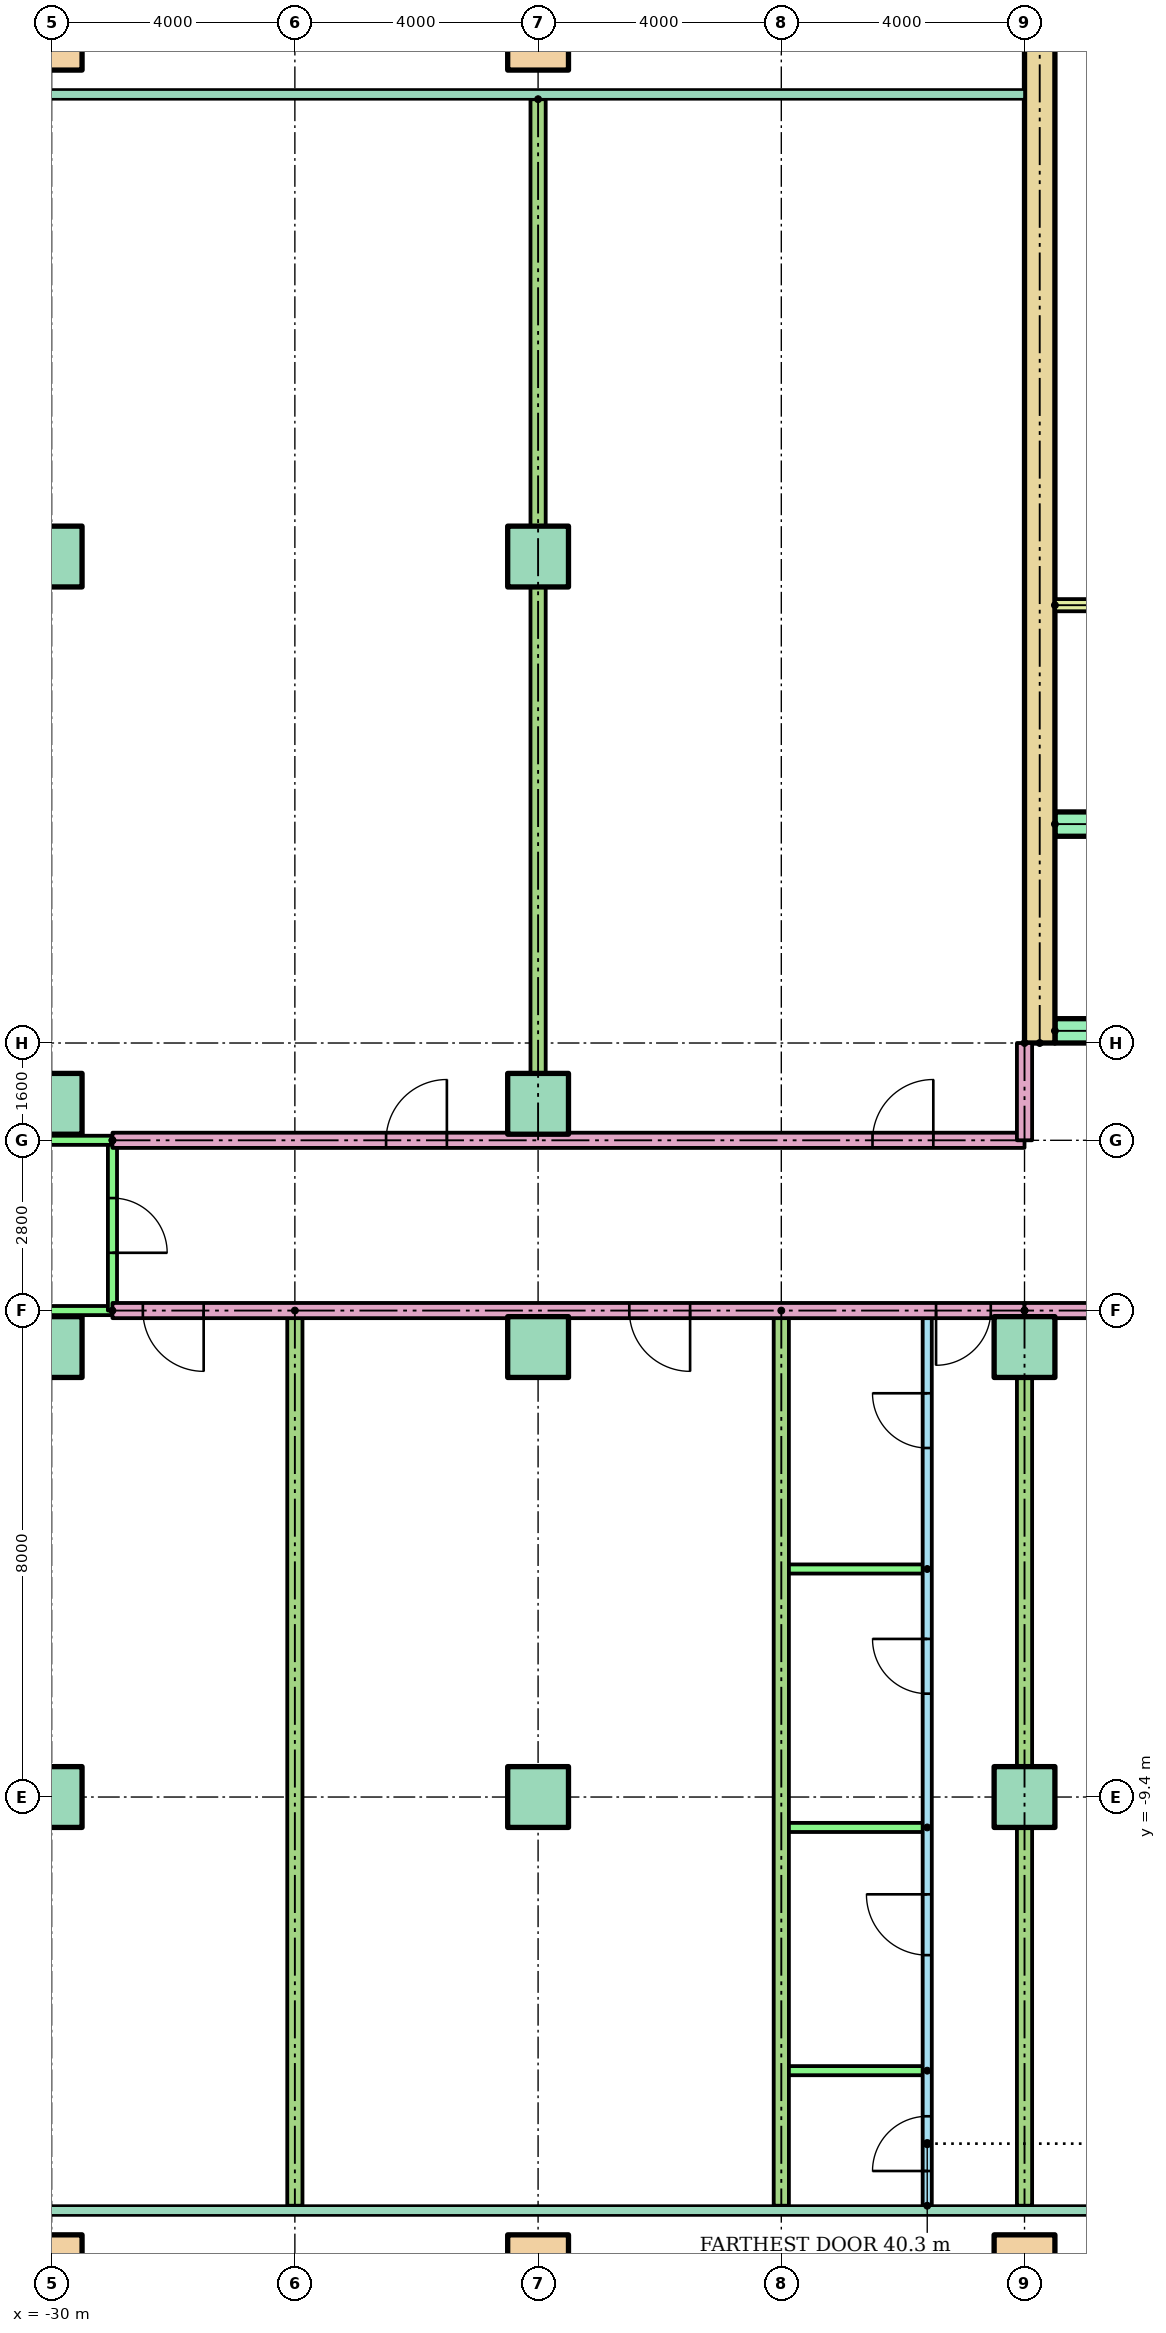
"""IFC4 building model, lengths in metres.
Left out: names, types, materials, properties, quantities, classifications, styles, units other than length and angle.
Written with IfcOpenShell. Run it as: python <this file> out.ifc"""

import sys

from ifc_helpers import new_model, si_unit, direction, frame, frame_2d, origin, origin_2d, place, context, subcontext, project, spatial, rectangle, hollow_rectangle, extrude, element, fill, save


model = new_model("IFC4")
c1 = context("Model", 3, precision=1e-05, world=origin(), true_north=direction((0.0, 1.0)))
c2 = subcontext(c1, "Body", "Model", "MODEL_VIEW")
j1 = project(units=[si_unit("LENGTHUNIT", "METRE"), si_unit("PLANEANGLEUNIT", "RADIAN")], contexts=[c1])
p1 = place(None, origin())
s1 = spatial("IfcSite", under=j1, at=p1, CompositionType="ELEMENT")
p2 = place(p1, origin())
s2 = spatial("IfcBuilding", under=s1, at=p2, CompositionType="ELEMENT")
p3 = place(p2, frame((0.0, 0.0, 29.9)))
s3 = spatial("IfcBuildingStorey", under=s2, at=p3, CompositionType="ELEMENT", Elevation=29.9)
for number, where in (
    (1, (-30.0, -17.1, 0.0)),
    (2, (-22.0, -17.1, 0.0)),
    (3, (-14.0, -17.1, 0.0)),
):
    element("IfcColumn", number, at=place(p3, frame(where)), inside=s3, PredefinedType="COLUMN", context=c2, shape_type="SweptSolid", body=[
        extrude(hollow_rectangle(XDim=1.0, YDim=1.0, WallThickness=0.05, at=origin_2d()), origin(), (0.0, 0.0, 1.0), 3.9),
    ])
for number, where in (
    (4, (-30.0, -9.4, 0.0)),
    (5, (-22.0, -9.4, 0.0)),
    (6, (-14.0, -9.4, 0.0)),
    (7, (-30.0, -2.0, 0.0)),
    (8, (-22.0, -2.0, 0.0)),
    (9, (-14.0, -2.0, 0.0)),
    (10, (-30.0, 2.0, 0.0)),
    (11, (-22.0, 2.0, 0.0)),
    (12, (-30.0, 11.0, 0.0)),
    (13, (-22.0, 11.0, 0.0)),
):
    element("IfcColumn", number, at=place(p3, frame(where)), inside=s3, PredefinedType="COLUMN", context=c2, shape_type="SweptSolid", body=[
        extrude(rectangle(XDim=1.0, YDim=1.0, at=origin_2d()), origin(), (0.0, 0.0, 1.0), 3.9),
    ])
for number, where in (
    (14, (-30.0, 19.5, 0.0)),
    (15, (-22.0, 19.5, 0.0)),
):
    element("IfcColumn", number, at=place(p3, frame(where)), inside=s3, PredefinedType="COLUMN", context=c2, shape_type="SweptSolid", body=[
        extrude(hollow_rectangle(XDim=1.0, YDim=1.0, WallThickness=0.05, at=origin_2d()), origin(), (0.0, 0.0, 1.0), 3.9),
    ])
p4 = place(p3, frame((-13.75, 3.0, 0.0), z_axis=(0.0, 0.0, 1.0), x_axis=(0.0, 1.0, 0.0)))
e16 = element("IfcWall", 16, at=p4, inside=s3, PredefinedType="SHEAR", context=c2, shape_type="SweptSolid", body=[
    extrude(rectangle(XDim=17.0, YDim=0.5, at=frame_2d((8.5, 0.0))), origin(), (0.0, 0.0, 1.0), 3.6),
])
p5 = place(p3, frame((-13.5, 3.2, 0.0)))
e17 = element("IfcWall", 17, at=p5, inside=s3, PredefinedType="SHEAR", context=c2, shape_type="SweptSolid", body=[
    extrude(rectangle(XDim=27.0, YDim=0.4, at=frame_2d((13.5, 0.0))), origin(), (0.0, 0.0, 1.0), 3.6),
])
p6 = place(p5, frame((6.861, 0.0, 0.0)))
e18 = element("IfcOpeningElement", 18, at=p6, cuts=e17, PredefinedType="OPENING", context=c2, shape_type="SweptSolid", body=[
    extrude(rectangle(XDim=1.1, YDim=2.1, at=frame_2d((0.55, 1.05))), frame((0.0, 0.21, 0.0), z_axis=(0.0, -1.0, 0.0), x_axis=(1.0, 0.0, 0.0)), (0.0, 0.0, 1.0), 0.42),
])
p7 = place(p5, frame((9.906, 0.0, 0.0)))
e19 = element("IfcOpeningElement", 19, at=p7, cuts=e17, PredefinedType="OPENING", context=c2, shape_type="SweptSolid", body=[
    extrude(rectangle(XDim=1.1, YDim=2.1, at=frame_2d((0.55, 1.05))), frame((0.0, 0.21, 0.0), z_axis=(0.0, -1.0, 0.0), x_axis=(1.0, 0.0, 0.0)), (0.0, 0.0, 1.0), 0.42),
])
p8 = place(p5, frame((15.994, 0.0, 0.0)))
e20 = element("IfcOpeningElement", 20, at=p8, cuts=e17, PredefinedType="OPENING", context=c2, shape_type="SweptSolid", body=[
    extrude(rectangle(XDim=1.1, YDim=2.1, at=frame_2d((0.55, 1.05))), frame((0.0, 0.21, 0.0), z_axis=(0.0, -1.0, 0.0), x_axis=(1.0, 0.0, 0.0)), (0.0, 0.0, 1.0), 0.42),
])
p9 = place(p5, frame((19.039, 0.0, 0.0)))
e21 = element("IfcOpeningElement", 21, at=p9, cuts=e17, PredefinedType="OPENING", context=c2, shape_type="SweptSolid", body=[
    extrude(rectangle(XDim=1.1, YDim=2.1, at=frame_2d((0.55, 1.05))), frame((0.0, 0.21, 0.0), z_axis=(0.0, -1.0, 0.0), x_axis=(1.0, 0.0, 0.0)), (0.0, 0.0, 1.0), 0.42),
])
p10 = place(p5, frame((12.6, 0.0, 0.0)))
e22 = element("IfcOpeningElement", 22, at=p10, cuts=e17, PredefinedType="OPENING", context=c2, shape_type="SweptSolid", body=[
    extrude(rectangle(XDim=1.8, YDim=2.1, at=frame_2d((0.9, 1.05))), frame((0.0, 0.21, 0.0), z_axis=(0.0, -1.0, 0.0), x_axis=(1.0, 0.0, 0.0)), (0.0, 0.0, 1.0), 0.42),
])
p11 = place(p3, frame((-13.5, 6.6, 0.0)))
e23 = element("IfcWall", 23, at=p11, inside=s3, PredefinedType="SHEAR", context=c2, shape_type="SweptSolid", body=[
    extrude(rectangle(XDim=11.978, YDim=0.4, at=frame_2d((5.989, 0.0))), origin(), (0.0, 0.0, 1.0), 3.6),
])
p12 = place(p3, frame((-13.5, 10.2, 0.0)))
e24 = element("IfcWall", 24, at=p12, inside=s3, PredefinedType="PARTITIONING", context=c2, shape_type="SweptSolid", body=[
    extrude(rectangle(XDim=3.9, YDim=0.2, at=frame_2d((1.95, 0.0))), origin(), (0.0, 0.0, 1.0), 3.6),
])
p13 = place(p3, frame((-14.0, -1.4, 0.0), z_axis=(0.0, 0.0, 1.0), x_axis=(-1.0, 0.0, 0.0)))
e25 = element("IfcWall", 25, at=p13, inside=s3, PredefinedType="PARTITIONING", context=c2, shape_type="SweptSolid", body=[
    extrude(rectangle(XDim=15.0, YDim=0.25, at=frame_2d((7.5, 0.0))), origin(), (0.0, 0.0, 1.0), 3.1),
])
p14 = place(p13, frame((0.555, 0.0, 0.0)))
e26 = element("IfcOpeningElement", 26, at=p14, cuts=e25, PredefinedType="OPENING", context=c2, shape_type="SweptSolid", body=[
    extrude(rectangle(XDim=0.9, YDim=2.1, at=frame_2d((0.45, 1.05))), frame((0.0, 0.135, 0.0), z_axis=(0.0, -1.0, 0.0), x_axis=(1.0, 0.0, 0.0)), (0.0, 0.0, 1.0), 0.27),
])
p15 = place(p13, frame((5.5, 0.0, 0.0)))
e27 = element("IfcOpeningElement", 27, at=p15, cuts=e25, PredefinedType="OPENING", context=c2, shape_type="SweptSolid", body=[
    extrude(rectangle(XDim=1.0, YDim=2.1, at=frame_2d((0.5, 1.05))), frame((0.0, 0.135, 0.0), z_axis=(0.0, -1.0, 0.0), x_axis=(1.0, 0.0, 0.0)), (0.0, 0.0, 1.0), 0.27),
])
p16 = place(p13, frame((13.5, 0.0, 0.0)))
e28 = element("IfcOpeningElement", 28, at=p16, cuts=e25, PredefinedType="OPENING", context=c2, shape_type="SweptSolid", body=[
    extrude(rectangle(XDim=1.0, YDim=2.1, at=frame_2d((0.5, 1.05))), frame((0.0, 0.135, 0.0), z_axis=(0.0, -1.0, 0.0), x_axis=(1.0, 0.0, 0.0)), (0.0, 0.0, 1.0), 0.27),
])
p17 = place(p3, frame((-29.0, -1.4, 0.0), z_axis=(0.0, 0.0, 1.0), x_axis=(-1.0, 0.0, 0.0)))
e29 = element("IfcWall", 29, at=p17, inside=s3, PredefinedType="PARTITIONING", context=c2, shape_type="SweptSolid", body=[
    extrude(rectangle(XDim=7.53, YDim=0.15, at=frame_2d((3.765, 0.0))), origin(), (0.0, 0.0, 1.0), 3.1),
])
p18 = place(p3, frame((-29.0, 1.4, 0.0), z_axis=(0.0, 0.0, 1.0), x_axis=(0.0, -1.0, 0.0)))
e30 = element("IfcWall", 30, at=p18, inside=s3, PredefinedType="PARTITIONING", context=c2, shape_type="SweptSolid", body=[
    extrude(rectangle(XDim=2.8, YDim=0.15, at=frame_2d((1.4, 0.0))), origin(), (0.0, 0.0, 1.0), 3.1),
])
p19 = place(p18, frame((0.95, 0.0, 0.0)))
e31 = element("IfcOpeningElement", 31, at=p19, cuts=e30, PredefinedType="OPENING", context=c2, shape_type="SweptSolid", body=[
    extrude(rectangle(XDim=0.9, YDim=2.1, at=frame_2d((0.45, 1.05))), frame((0.0, 0.085, 0.0), z_axis=(0.0, -1.0, 0.0), x_axis=(1.0, 0.0, 0.0)), (0.0, 0.0, 1.0), 0.17),
])
p20 = place(p3, frame((-15.6, -16.121, 0.0), z_axis=(0.0, 0.0, 1.0), x_axis=(0.0, 1.0, 0.0)))
e32 = element("IfcWall", 32, at=p20, inside=s3, PredefinedType="PARTITIONING", context=c2, shape_type="SweptSolid", body=[
    extrude(rectangle(XDim=14.721, YDim=0.15, at=frame_2d((7.361, 0.0))), origin(), (0.0, 0.0, 1.0), 3.1),
])
p21 = place(p20, frame((12.461, 0.0, 0.0)))
e33 = element("IfcOpeningElement", 33, at=p21, cuts=e32, PredefinedType="OPENING", context=c2, shape_type="SweptSolid", body=[
    extrude(rectangle(XDim=0.9, YDim=2.1, at=frame_2d((0.45, 1.05))), frame((0.0, 0.085, 0.0), z_axis=(0.0, -1.0, 0.0), x_axis=(1.0, 0.0, 0.0)), (0.0, 0.0, 1.0), 0.17),
])
p22 = place(p20, frame((8.421, 0.0, 0.0)))
e34 = element("IfcOpeningElement", 34, at=p22, cuts=e32, PredefinedType="OPENING", context=c2, shape_type="SweptSolid", body=[
    extrude(rectangle(XDim=0.9, YDim=2.1, at=frame_2d((0.45, 1.05))), frame((0.0, 0.085, 0.0), z_axis=(0.0, -1.0, 0.0), x_axis=(1.0, 0.0, 0.0)), (0.0, 0.0, 1.0), 0.17),
])
p23 = place(p20, frame((4.121, 0.0, 0.0)))
e35 = element("IfcOpeningElement", 35, at=p23, cuts=e32, PredefinedType="OPENING", context=c2, shape_type="SweptSolid", body=[
    extrude(rectangle(XDim=1.0, YDim=2.1, at=frame_2d((0.5, 1.05))), frame((0.0, 0.085, 0.0), z_axis=(0.0, -1.0, 0.0), x_axis=(1.0, 0.0, 0.0)), (0.0, 0.0, 1.0), 0.17),
])
p24 = place(p20, frame((0.571, 0.0, 0.0)))
e36 = element("IfcOpeningElement", 36, at=p24, cuts=e32, PredefinedType="OPENING", context=c2, shape_type="SweptSolid", body=[
    extrude(rectangle(XDim=0.9, YDim=2.1, at=frame_2d((0.45, 1.05))), frame((0.0, 0.085, 0.0), z_axis=(0.0, -1.0, 0.0), x_axis=(1.0, 0.0, 0.0)), (0.0, 0.0, 1.0), 0.17),
])
for number, where, z_axis, x_axis in (
    (37, (-15.6, -5.65, 0.0), (0.0, 0.0, 1.0), (-1.0, 0.0, 0.0)),
    (38, (-15.6, -9.9, 0.0), (0.0, 0.0, 1.0), (-1.0, 0.0, 0.0)),
    (39, (-15.6, -13.9, 0.0), (0.0, 0.0, 1.0), (-1.0, 0.0, 0.0)),
):
    element("IfcWall", number, at=place(p3, frame(where, z_axis=z_axis, x_axis=x_axis)), inside=s3, PredefinedType="PARTITIONING", context=c2, shape_type="SweptSolid", body=[
        extrude(rectangle(XDim=2.4, YDim=0.15, at=frame_2d((1.2, 0.0))), origin(), (0.0, 0.0, 1.0), 3.1),
    ])
for number, where, z_axis, x_axis in (
    (40, (-26.0, -1.4, 0.0), (0.0, 0.0, 1.0), (0.0, -1.0, 0.0)),
    (41, (-18.0, -1.4, 0.0), (0.0, 0.0, 1.0), (0.0, -1.0, 0.0)),
    (42, (-14.0, -1.4, 0.0), (0.0, 0.0, 1.0), (0.0, -1.0, 0.0)),
):
    element("IfcWall", number, at=place(p3, frame(where, z_axis=z_axis, x_axis=x_axis)), inside=s3, PredefinedType="PARTITIONING", context=c2, shape_type="SweptSolid", body=[
        extrude(rectangle(XDim=14.721, YDim=0.25, at=frame_2d((7.361, 0.0))), origin(), (0.0, 0.0, 1.0), 3.1),
    ])
p25 = place(p3, frame((-29.0, 1.4, 0.0)))
e43 = element("IfcWall", 43, at=p25, inside=s3, PredefinedType="PARTITIONING", context=c2, shape_type="SweptSolid", body=[
    extrude(rectangle(XDim=15.0, YDim=0.25, at=frame_2d((7.5, 0.0))), origin(), (0.0, 0.0, 1.0), 3.1),
])
p26 = place(p25, frame((12.5, 0.0, 0.0)))
e44 = element("IfcOpeningElement", 44, at=p26, cuts=e43, PredefinedType="OPENING", context=c2, shape_type="SweptSolid", body=[
    extrude(rectangle(XDim=1.0, YDim=2.1, at=frame_2d((0.5, 1.05))), frame((0.0, 0.135, 0.0), z_axis=(0.0, -1.0, 0.0), x_axis=(1.0, 0.0, 0.0)), (0.0, 0.0, 1.0), 0.27),
])
p27 = place(p25, frame((4.5, 0.0, 0.0)))
e45 = element("IfcOpeningElement", 45, at=p27, cuts=e43, PredefinedType="OPENING", context=c2, shape_type="SweptSolid", body=[
    extrude(rectangle(XDim=1.0, YDim=2.1, at=frame_2d((0.5, 1.05))), frame((0.0, 0.135, 0.0), z_axis=(0.0, -1.0, 0.0), x_axis=(1.0, 0.0, 0.0)), (0.0, 0.0, 1.0), 0.27),
])
p28 = place(p3, frame((-36.53, 1.4, 0.0)))
e46 = element("IfcWall", 46, at=p28, inside=s3, PredefinedType="PARTITIONING", context=c2, shape_type="SweptSolid", body=[
    extrude(rectangle(XDim=7.53, YDim=0.15, at=frame_2d((3.765, 0.0))), origin(), (0.0, 0.0, 1.0), 3.1),
])
p29 = place(p3, frame((-22.0, 18.521, 0.0), z_axis=(0.0, 0.0, 1.0), x_axis=(0.0, -1.0, 0.0)))
e47 = element("IfcWall", 47, at=p29, inside=s3, PredefinedType="PARTITIONING", context=c2, shape_type="SweptSolid", body=[
    extrude(rectangle(XDim=17.121, YDim=0.25, at=frame_2d((8.561, 0.0))), origin(), (0.0, 0.0, 1.0), 3.1),
])
p30 = place(p3, frame((14.0, -1.4, 0.0), z_axis=(0.0, 0.0, 1.0), x_axis=(-1.0, 0.0, 0.0)))
e48 = element("IfcWall", 48, at=p30, inside=s3, PredefinedType="PARTITIONING", context=c2, shape_type="SweptSolid", body=[
    extrude(rectangle(XDim=28.0, YDim=0.25, at=frame_2d((14.0, 0.0))), origin(), (0.0, 0.0, 1.0), 3.1),
])
p31 = place(p30, frame((25.5, 0.0, 0.0)))
e49 = element("IfcOpeningElement", 49, at=p31, cuts=e48, PredefinedType="OPENING", context=c2, shape_type="SweptSolid", body=[
    extrude(rectangle(XDim=1.0, YDim=2.1, at=frame_2d((0.5, 1.05))), frame((0.0, 0.135, 0.0), z_axis=(0.0, -1.0, 0.0), x_axis=(1.0, 0.0, 0.0)), (0.0, 0.0, 1.0), 0.27),
])
p32 = place(p30, frame((1.5, 0.0, 0.0)))
e50 = element("IfcOpeningElement", 50, at=p32, cuts=e48, PredefinedType="OPENING", context=c2, shape_type="SweptSolid", body=[
    extrude(rectangle(XDim=1.0, YDim=2.1, at=frame_2d((0.5, 1.05))), frame((0.0, 0.135, 0.0), z_axis=(0.0, -1.0, 0.0), x_axis=(1.0, 0.0, 0.0)), (0.0, 0.0, 1.0), 0.27),
])
p33 = place(p3, frame((-14.0, 3.0, 0.0), z_axis=(0.0, 0.0, 1.0), x_axis=(0.0, -1.0, 0.0)))
e51 = element("IfcWall", 51, at=p33, inside=s3, PredefinedType="PARTITIONING", context=c2, shape_type="SweptSolid", body=[
    extrude(rectangle(XDim=1.6, YDim=0.25, at=frame_2d((0.8, 0.0))), origin(), (0.0, 0.0, 1.0), 3.1),
])
p34 = place(p21, origin())
e52 = element("IfcDoor", 52, at=p34, inside=s3, OperationType="SINGLE_SWING_RIGHT", PredefinedType="DOOR", context=c2, shape_type="SweptSolid", body=[
    extrude(rectangle(XDim=0.9, YDim=2.1, at=frame_2d((0.45, 1.05))), frame((0.0, 0.025, 0.0), z_axis=(0.0, -1.0, 0.0), x_axis=(1.0, 0.0, 0.0)), (0.0, 0.0, 1.0), 0.05),
])
fill(e33, e52)
p35 = place(p22, origin())
e53 = element("IfcDoor", 53, at=p35, inside=s3, OperationType="SINGLE_SWING_RIGHT", PredefinedType="DOOR", context=c2, shape_type="SweptSolid", body=[
    extrude(rectangle(XDim=0.9, YDim=2.1, at=frame_2d((0.45, 1.05))), frame((0.0, 0.025, 0.0), z_axis=(0.0, -1.0, 0.0), x_axis=(1.0, 0.0, 0.0)), (0.0, 0.0, 1.0), 0.05),
])
fill(e34, e53)
p36 = place(p23, origin())
e54 = element("IfcDoor", 54, at=p36, inside=s3, OperationType="SINGLE_SWING_RIGHT", PredefinedType="DOOR", context=c2, shape_type="SweptSolid", body=[
    extrude(rectangle(XDim=1.0, YDim=2.1, at=frame_2d((0.5, 1.05))), frame((0.0, 0.025, 0.0), z_axis=(0.0, -1.0, 0.0), x_axis=(1.0, 0.0, 0.0)), (0.0, 0.0, 1.0), 0.05),
])
fill(e35, e54)
p37 = place(p24, origin())
e55 = element("IfcDoor", 55, at=p37, inside=s3, OperationType="SINGLE_SWING_LEFT", PredefinedType="DOOR", context=c2, shape_type="SweptSolid", body=[
    extrude(rectangle(XDim=0.9, YDim=2.1, at=frame_2d((0.45, 1.05))), frame((0.0, 0.025, 0.0), z_axis=(0.0, -1.0, 0.0), x_axis=(1.0, 0.0, 0.0)), (0.0, 0.0, 1.0), 0.05),
])
fill(e36, e55)
p38 = place(p14, origin())
e56 = element("IfcDoor", 56, at=p38, inside=s3, OperationType="SINGLE_SWING_RIGHT", PredefinedType="DOOR", context=c2, shape_type="SweptSolid", body=[
    extrude(rectangle(XDim=0.9, YDim=2.1, at=frame_2d((0.45, 1.05))), frame((0.0, 0.025, 0.0), z_axis=(0.0, -1.0, 0.0), x_axis=(1.0, 0.0, 0.0)), (0.0, 0.0, 1.0), 0.05),
])
fill(e26, e56)
p39 = place(p15, origin())
e57 = element("IfcDoor", 57, at=p39, inside=s3, OperationType="SINGLE_SWING_LEFT", PredefinedType="DOOR", context=c2, shape_type="SweptSolid", body=[
    extrude(rectangle(XDim=1.0, YDim=2.1, at=frame_2d((0.5, 1.05))), frame((0.0, 0.025, 0.0), z_axis=(0.0, -1.0, 0.0), x_axis=(1.0, 0.0, 0.0)), (0.0, 0.0, 1.0), 0.05),
])
fill(e27, e57)
p40 = place(p16, origin())
e58 = element("IfcDoor", 58, at=p40, inside=s3, OperationType="SINGLE_SWING_LEFT", PredefinedType="DOOR", context=c2, shape_type="SweptSolid", body=[
    extrude(rectangle(XDim=1.0, YDim=2.1, at=frame_2d((0.5, 1.05))), frame((0.0, 0.025, 0.0), z_axis=(0.0, -1.0, 0.0), x_axis=(1.0, 0.0, 0.0)), (0.0, 0.0, 1.0), 0.05),
])
fill(e28, e58)
p41 = place(p19, origin())
e59 = element("IfcDoor", 59, at=p41, inside=s3, OperationType="SINGLE_SWING_RIGHT", PredefinedType="DOOR", context=c2, shape_type="SweptSolid", body=[
    extrude(rectangle(XDim=0.9, YDim=2.1, at=frame_2d((0.45, 1.05))), frame((0.0, 0.025, 0.0), z_axis=(0.0, -1.0, 0.0), x_axis=(1.0, 0.0, 0.0)), (0.0, 0.0, 1.0), 0.05),
])
fill(e31, e59)
p42 = place(p26, origin())
e60 = element("IfcDoor", 60, at=p42, inside=s3, OperationType="SINGLE_SWING_RIGHT", PredefinedType="DOOR", context=c2, shape_type="SweptSolid", body=[
    extrude(rectangle(XDim=1.0, YDim=2.1, at=frame_2d((0.5, 1.05))), frame((0.0, 0.025, 0.0), z_axis=(0.0, -1.0, 0.0), x_axis=(1.0, 0.0, 0.0)), (0.0, 0.0, 1.0), 0.05),
])
fill(e44, e60)
p43 = place(p27, origin())
e61 = element("IfcDoor", 61, at=p43, inside=s3, OperationType="SINGLE_SWING_RIGHT", PredefinedType="DOOR", context=c2, shape_type="SweptSolid", body=[
    extrude(rectangle(XDim=1.0, YDim=2.1, at=frame_2d((0.5, 1.05))), frame((0.0, 0.025, 0.0), z_axis=(0.0, -1.0, 0.0), x_axis=(1.0, 0.0, 0.0)), (0.0, 0.0, 1.0), 0.05),
])
fill(e45, e61)
save(model, sys.argv[1])
